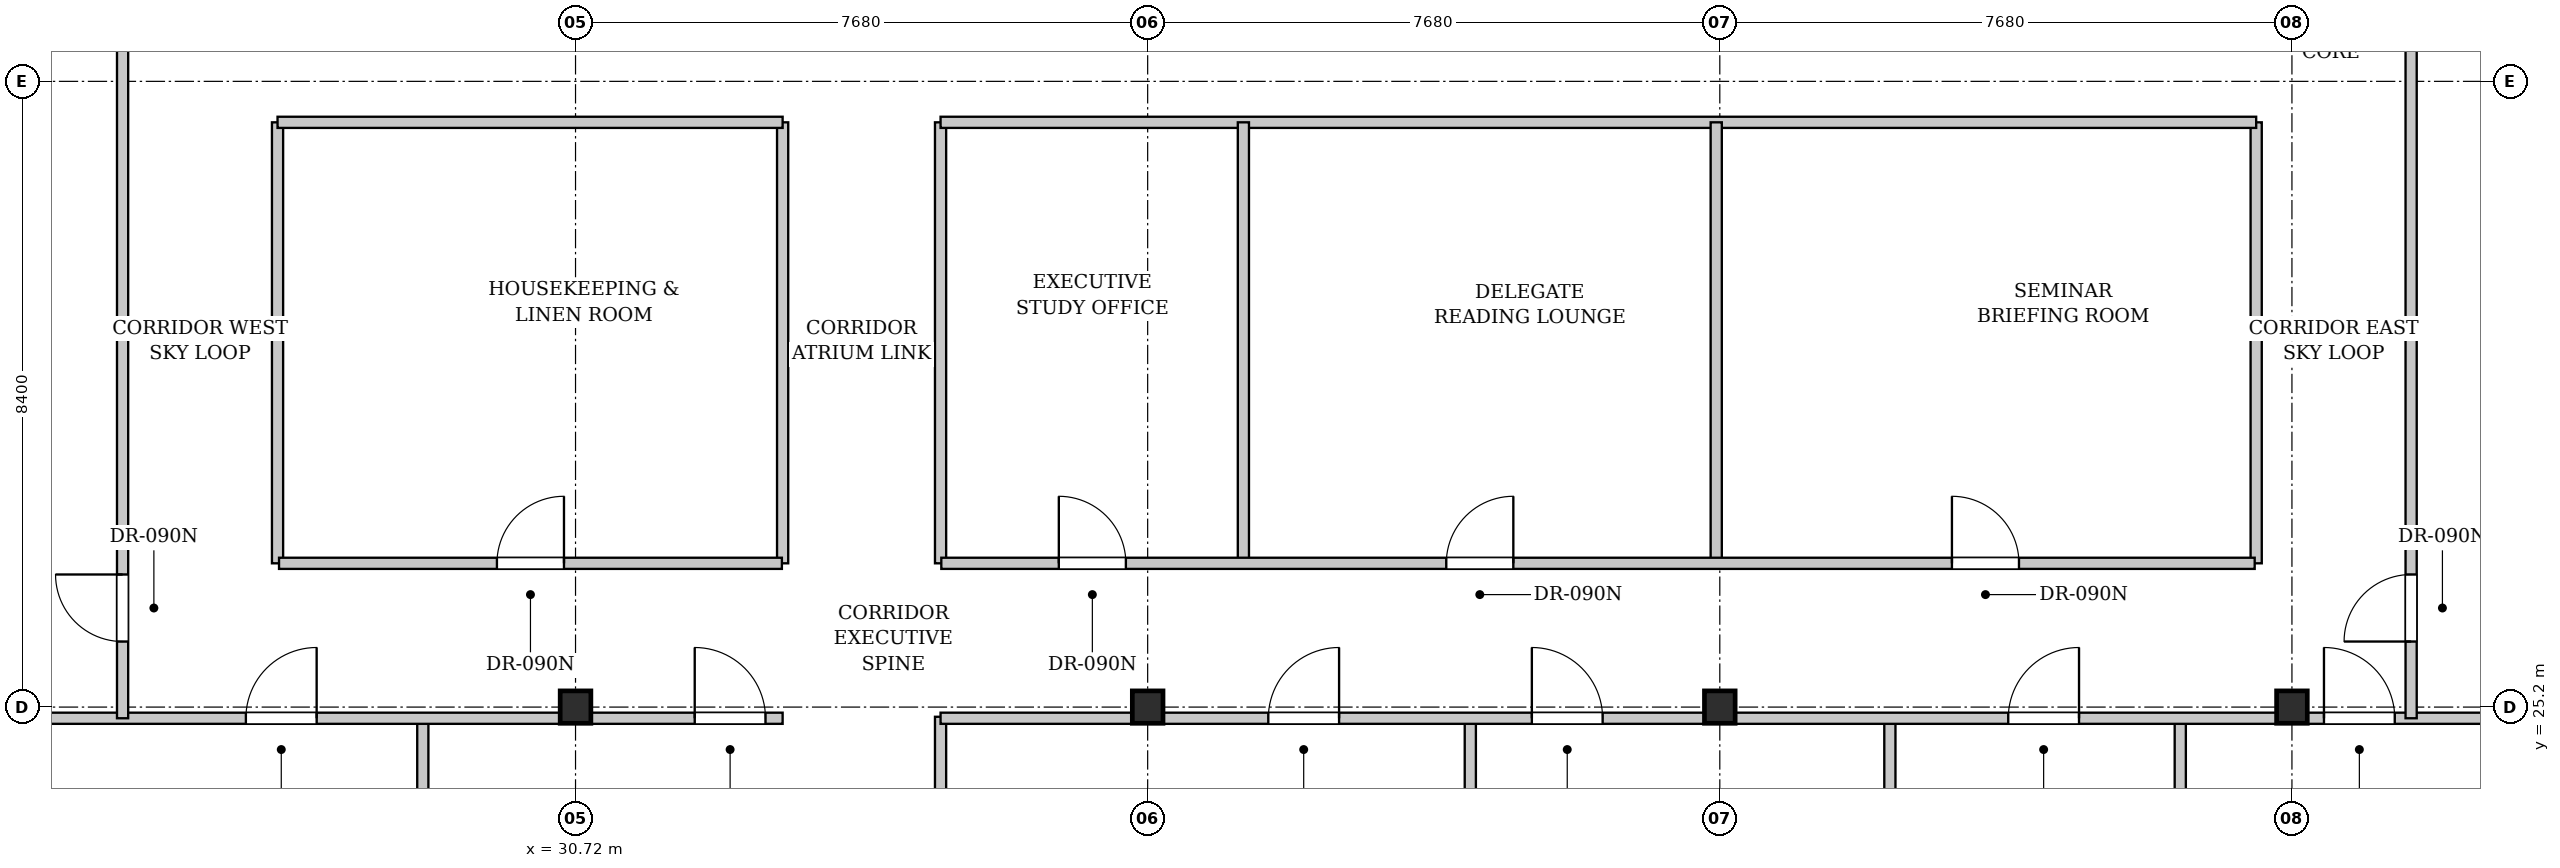
"""IFC4 building model, lengths in metres.
Left out: names, types, materials, properties, quantities, classifications, styles, units other than length and angle.
Written with IfcOpenShell. Run it as: python <this file> out.ifc"""

import sys

from ifc_helpers import new_model, si_unit, direction, frame, frame_2d, origin, origin_2d, place, context, subcontext, project, spatial, rectangle, i_section, extrude, element, fill, save


model = new_model("IFC4")
c1 = context("Model", 3, precision=1e-05, world=origin(), true_north=direction((0.0, 1.0)))
c2 = subcontext(c1, "Body", "Model", "MODEL_VIEW")
j1 = project(units=[si_unit("LENGTHUNIT", "METRE"), si_unit("PLANEANGLEUNIT", "RADIAN")], contexts=[c1])
p1 = place(None, origin())
s1 = spatial("IfcSite", under=j1, at=p1, CompositionType="ELEMENT")
p2 = place(p1, origin())
s2 = spatial("IfcBuilding", under=s1, at=p2, CompositionType="ELEMENT")
p3 = place(p2, frame((0.0, 0.0, 237.5)))
s3 = spatial("IfcBuildingStorey", under=s2, at=p3, CompositionType="ELEMENT", Elevation=237.5)
for number, where, z_axis, x_axis in (
    (1, (30.72, 25.2, 0.0), (0.0, 0.0, 1.0), (1.0, 0.0, 0.0)),
    (2, (38.4, 25.2, 0.0), (0.0, 0.0, 1.0), (1.0, 0.0, 0.0)),
    (3, (46.08, 25.2, 0.0), (0.0, 0.0, 1.0), (1.0, 0.0, 0.0)),
    (4, (53.76, 25.2, 0.0), (0.0, 0.0, 1.0), (1.0, 0.0, 0.0)),
):
    element("IfcColumn", number, at=place(p3, frame(where, z_axis=z_axis, x_axis=x_axis)), inside=s3, PredefinedType="COLUMN", context=c2, shape_type="SweptSolid", body=[
        extrude(i_section(OverallWidth=0.412, OverallDepth=0.435, WebThickness=0.036, FlangeThickness=0.058, FilletRadius=0.015, at=origin_2d()), origin(), (0.0, 0.0, 1.0), 3.3),
    ])
p4 = place(p3, frame((28.67, 12.88, 0.0), z_axis=(0.0, 0.0, 1.0), x_axis=(0.0, 1.0, 0.0)))
e5 = element("IfcWall", 5, at=p4, inside=s3, PredefinedType="PARTITIONING", context=c2, shape_type="SweptSolid", body=[
    extrude(rectangle(XDim=12.19, YDim=0.15, at=frame_2d((6.095, 0.0))), origin(), (0.0, 0.0, 1.0), 3.08),
])
p5 = place(p3, frame((35.62, 13.611, 0.0), z_axis=(0.0, 0.0, 1.0), x_axis=(0.0, 1.0, 0.0)))
e6 = element("IfcWall", 6, at=p5, inside=s3, PredefinedType="PARTITIONING", context=c2, shape_type="SweptSolid", body=[
    extrude(rectangle(XDim=11.459, YDim=0.15, at=frame_2d((5.73, 0.0))), origin(), (0.0, 0.0, 1.0), 3.08),
])
p6 = place(p3, frame((42.731, 14.358, 0.0), z_axis=(0.0, 0.0, 1.0), x_axis=(0.0, 1.0, 0.0)))
e7 = element("IfcWall", 7, at=p6, inside=s3, PredefinedType="PARTITIONING", context=c2, shape_type="SweptSolid", body=[
    extrude(rectangle(XDim=10.712, YDim=0.15, at=frame_2d((5.356, 0.0))), origin(), (0.0, 0.0, 1.0), 3.08),
])
p7 = place(p3, frame((48.363, 14.95, 0.0), z_axis=(0.0, 0.0, 1.0), x_axis=(0.0, 1.0, 0.0)))
e8 = element("IfcWall", 8, at=p7, inside=s3, PredefinedType="PARTITIONING", context=c2, shape_type="SweptSolid", body=[
    extrude(rectangle(XDim=10.12, YDim=0.15, at=frame_2d((5.06, 0.0))), origin(), (0.0, 0.0, 1.0), 3.08),
])
p8 = place(p3, frame((52.261, 15.36, 0.0), z_axis=(0.0, 0.0, 1.0), x_axis=(0.0, 1.0, 0.0)))
e9 = element("IfcWall", 9, at=p8, inside=s3, PredefinedType="PARTITIONING", context=c2, shape_type="SweptSolid", body=[
    extrude(rectangle(XDim=9.71, YDim=0.15, at=frame_2d((4.855, 0.0))), origin(), (0.0, 0.0, 1.0), 3.08),
])
p9 = place(p3, frame((17.314, 25.05, 0.0), z_axis=(0.0, 0.0, 1.0), x_axis=(1.0, 0.0, 0.0)))
e10 = element("IfcWall", 10, at=p9, inside=s3, PredefinedType="PARTITIONING", context=c2, shape_type="SweptSolid", body=[
    extrude(rectangle(XDim=16.186, YDim=0.15, at=frame_2d((8.093, 0.0))), origin(), (0.0, 0.0, 1.0), 2.313),
])
p10 = place(p9, frame((8.981, 0.0, 0.0)))
e11 = element("IfcOpeningElement", 11, at=p10, cuts=e10, PredefinedType="OPENING", context=c2, shape_type="SweptSolid", body=[
    extrude(rectangle(XDim=0.95, YDim=2.15, at=frame_2d((0.475, 1.075))), frame((0.0, 0.085, 0.0), z_axis=(0.0, -1.0, 0.0), x_axis=(1.0, 0.0, 0.0)), (0.0, 0.0, 1.0), 0.17),
])
p11 = place(p9, frame((15.006, 0.0, 0.0)))
e12 = element("IfcOpeningElement", 12, at=p11, cuts=e10, PredefinedType="OPENING", context=c2, shape_type="SweptSolid", body=[
    extrude(rectangle(XDim=0.95, YDim=2.15, at=frame_2d((0.475, 1.075))), frame((0.0, 0.085, 0.0), z_axis=(0.0, -1.0, 0.0), x_axis=(1.0, 0.0, 0.0)), (0.0, 0.0, 1.0), 0.17),
])
p12 = place(p3, frame((35.62, 25.05, 0.0), z_axis=(0.0, 0.0, 1.0), x_axis=(1.0, 0.0, 0.0)))
e13 = element("IfcWall", 13, at=p12, inside=s3, PredefinedType="PARTITIONING", context=c2, shape_type="SweptSolid", body=[
    extrude(rectangle(XDim=35.529, YDim=0.15, at=frame_2d((17.764, 0.0))), origin(), (0.0, 0.0, 1.0), 2.313),
])
p13 = place(p12, frame((4.399, 0.0, 0.0)))
e14 = element("IfcOpeningElement", 14, at=p13, cuts=e13, PredefinedType="OPENING", context=c2, shape_type="SweptSolid", body=[
    extrude(rectangle(XDim=0.95, YDim=2.15, at=frame_2d((0.475, 1.075))), frame((0.0, 0.085, 0.0), z_axis=(0.0, -1.0, 0.0), x_axis=(1.0, 0.0, 0.0)), (0.0, 0.0, 1.0), 0.17),
])
p14 = place(p12, frame((7.937, 0.0, 0.0)))
e15 = element("IfcOpeningElement", 15, at=p14, cuts=e13, PredefinedType="OPENING", context=c2, shape_type="SweptSolid", body=[
    extrude(rectangle(XDim=0.95, YDim=2.15, at=frame_2d((0.475, 1.075))), frame((0.0, 0.085, 0.0), z_axis=(0.0, -1.0, 0.0), x_axis=(1.0, 0.0, 0.0)), (0.0, 0.0, 1.0), 0.17),
])
p15 = place(p12, frame((14.332, 0.0, 0.0)))
e16 = element("IfcOpeningElement", 16, at=p15, cuts=e13, PredefinedType="OPENING", context=c2, shape_type="SweptSolid", body=[
    extrude(rectangle(XDim=0.95, YDim=2.15, at=frame_2d((0.475, 1.075))), frame((0.0, 0.085, 0.0), z_axis=(0.0, -1.0, 0.0), x_axis=(1.0, 0.0, 0.0)), (0.0, 0.0, 1.0), 0.17),
])
p16 = place(p12, frame((18.57, 0.0, 0.0)))
e17 = element("IfcOpeningElement", 17, at=p16, cuts=e13, PredefinedType="OPENING", context=c2, shape_type="SweptSolid", body=[
    extrude(rectangle(XDim=0.95, YDim=2.15, at=frame_2d((0.475, 1.075))), frame((0.0, 0.085, 0.0), z_axis=(0.0, -1.0, 0.0), x_axis=(1.0, 0.0, 0.0)), (0.0, 0.0, 1.0), 0.17),
])
p17 = place(p3, frame((24.64, 25.05, 0.0), z_axis=(0.0, 0.0, 1.0), x_axis=(0.0, 1.0, 0.0)))
e18 = element("IfcWall", 18, at=p17, inside=s3, PredefinedType="PARTITIONING", context=c2, shape_type="SweptSolid", body=[
    extrude(rectangle(XDim=10.09, YDim=0.15, at=frame_2d((5.045, 0.0))), origin(), (0.0, 0.0, 1.0), 3.08),
])
p18 = place(p17, frame((1.03, 0.0, 0.0)))
e19 = element("IfcOpeningElement", 19, at=p18, cuts=e18, PredefinedType="OPENING", context=c2, shape_type="SweptSolid", body=[
    extrude(rectangle(XDim=0.9, YDim=2.15, at=frame_2d((0.45, 1.075))), frame((0.0, 0.085, 0.0), z_axis=(0.0, -1.0, 0.0), x_axis=(1.0, 0.0, 0.0)), (0.0, 0.0, 1.0), 0.17),
])
p19 = place(p3, frame((55.36, 25.05, 0.0), z_axis=(0.0, 0.0, 1.0), x_axis=(0.0, 1.0, 0.0)))
e20 = element("IfcWall", 20, at=p19, inside=s3, PredefinedType="PARTITIONING", context=c2, shape_type="SweptSolid", body=[
    extrude(rectangle(XDim=24.863, YDim=0.15, at=frame_2d((12.431, 0.0))), origin(), (0.0, 0.0, 1.0), 3.08),
])
p20 = place(p19, frame((1.03, 0.0, 0.0)))
e21 = element("IfcOpeningElement", 21, at=p20, cuts=e20, PredefinedType="OPENING", context=c2, shape_type="SweptSolid", body=[
    extrude(rectangle(XDim=0.9, YDim=2.15, at=frame_2d((0.45, 1.075))), frame((0.0, 0.085, 0.0), z_axis=(0.0, -1.0, 0.0), x_axis=(1.0, 0.0, 0.0)), (0.0, 0.0, 1.0), 0.17),
])
for number, where, z_axis, x_axis in (
    (22, (26.72, 27.13, 0.0), (0.0, 0.0, 1.0), (0.0, 1.0, 0.0)),
    (23, (53.28, 27.13, 0.0), (0.0, 0.0, 1.0), (0.0, 1.0, 0.0)),
    (24, (33.5, 27.13, 0.0), (0.0, 0.0, 1.0), (0.0, 1.0, 0.0)),
    (25, (35.62, 27.13, 0.0), (0.0, 0.0, 1.0), (0.0, 1.0, 0.0)),
):
    element("IfcWall", number, at=place(p3, frame(where, z_axis=z_axis, x_axis=x_axis)), inside=s3, PredefinedType="PARTITIONING", context=c2, shape_type="SweptSolid", body=[
        extrude(rectangle(XDim=5.92, YDim=0.15, at=frame_2d((2.96, 0.0))), origin(), (0.0, 0.0, 1.0), 3.08),
    ])
p21 = place(p3, frame((26.72, 33.05, 0.0), z_axis=(0.0, 0.0, 1.0), x_axis=(1.0, 0.0, 0.0)))
e26 = element("IfcWall", 26, at=p21, inside=s3, PredefinedType="PARTITIONING", context=c2, shape_type="SweptSolid", body=[
    extrude(rectangle(XDim=6.78, YDim=0.15, at=frame_2d((3.39, 0.0))), origin(), (0.0, 0.0, 1.0), 3.08),
])
p22 = place(p3, frame((35.62, 33.05, 0.0), z_axis=(0.0, 0.0, 1.0), x_axis=(1.0, 0.0, 0.0)))
e27 = element("IfcWall", 27, at=p22, inside=s3, PredefinedType="PARTITIONING", context=c2, shape_type="SweptSolid", body=[
    extrude(rectangle(XDim=17.66, YDim=0.15, at=frame_2d((8.83, 0.0))), origin(), (0.0, 0.0, 1.0), 3.08),
])
p23 = place(p3, frame((26.74, 27.13, 0.0), z_axis=(0.0, 0.0, 1.0), x_axis=(1.0, 0.0, 0.0)))
e28 = element("IfcWall", 28, at=p23, inside=s3, PredefinedType="PARTITIONING", context=c2, shape_type="SweptSolid", body=[
    extrude(rectangle(XDim=6.75, YDim=0.15, at=frame_2d((3.375, 0.0))), origin(), (0.0, 0.0, 1.0), 3.08),
])
p24 = place(p23, frame((2.925, 0.0, 0.0)))
e29 = element("IfcOpeningElement", 29, at=p24, cuts=e28, PredefinedType="OPENING", context=c2, shape_type="SweptSolid", body=[
    extrude(rectangle(XDim=0.9, YDim=2.15, at=frame_2d((0.45, 1.075))), frame((0.0, 0.085, 0.0), z_axis=(0.0, -1.0, 0.0), x_axis=(1.0, 0.0, 0.0)), (0.0, 0.0, 1.0), 0.17),
])
p25 = place(p3, frame((39.685, 27.13, 0.0), z_axis=(0.0, 0.0, 1.0), x_axis=(0.0, 1.0, 0.0)))
e30 = element("IfcWall", 30, at=p25, inside=s3, PredefinedType="PARTITIONING", context=c2, shape_type="SweptSolid", body=[
    extrude(rectangle(XDim=5.92, YDim=0.15, at=frame_2d((2.96, 0.0))), origin(), (0.0, 0.0, 1.0), 3.08),
])
p26 = place(p3, frame((46.032, 27.13, 0.0), z_axis=(0.0, 0.0, 1.0), x_axis=(0.0, 1.0, 0.0)))
e31 = element("IfcWall", 31, at=p26, inside=s3, PredefinedType="PARTITIONING", context=c2, shape_type="SweptSolid", body=[
    extrude(rectangle(XDim=5.92, YDim=0.15, at=frame_2d((2.96, 0.0))), origin(), (0.0, 0.0, 1.0), 2.313),
])
p27 = place(p3, frame((35.63, 27.13, 0.0), z_axis=(0.0, 0.0, 1.0), x_axis=(1.0, 0.0, 0.0)))
e32 = element("IfcWall", 32, at=p27, inside=s3, PredefinedType="PARTITIONING", context=c2, shape_type="SweptSolid", body=[
    extrude(rectangle(XDim=17.63, YDim=0.15, at=frame_2d((8.815, 0.0))), origin(), (0.0, 0.0, 1.0), 3.08),
])
p28 = place(p27, frame((1.577, 0.0, 0.0)))
e33 = element("IfcOpeningElement", 33, at=p28, cuts=e32, PredefinedType="OPENING", context=c2, shape_type="SweptSolid", body=[
    extrude(rectangle(XDim=0.9, YDim=2.15, at=frame_2d((0.45, 1.075))), frame((0.0, 0.085, 0.0), z_axis=(0.0, -1.0, 0.0), x_axis=(1.0, 0.0, 0.0)), (0.0, 0.0, 1.0), 0.17),
])
p29 = place(p27, frame((6.779, 0.0, 0.0)))
e34 = element("IfcOpeningElement", 34, at=p29, cuts=e32, PredefinedType="OPENING", context=c2, shape_type="SweptSolid", body=[
    extrude(rectangle(XDim=0.9, YDim=2.15, at=frame_2d((0.45, 1.075))), frame((0.0, 0.085, 0.0), z_axis=(0.0, -1.0, 0.0), x_axis=(1.0, 0.0, 0.0)), (0.0, 0.0, 1.0), 0.17),
])
p30 = place(p27, frame((13.566, 0.0, 0.0)))
e35 = element("IfcOpeningElement", 35, at=p30, cuts=e32, PredefinedType="OPENING", context=c2, shape_type="SweptSolid", body=[
    extrude(rectangle(XDim=0.9, YDim=2.15, at=frame_2d((0.45, 1.075))), frame((0.0, 0.085, 0.0), z_axis=(0.0, -1.0, 0.0), x_axis=(1.0, 0.0, 0.0)), (0.0, 0.0, 1.0), 0.17),
])
p31 = place(p10, origin())
e36 = element("IfcDoor", 36, at=p31, inside=s3, OperationType="SINGLE_SWING_RIGHT", PredefinedType="DOOR", context=c2, shape_type="SweptSolid", body=[
    extrude(rectangle(XDim=0.95, YDim=2.15, at=frame_2d((0.475, 1.075))), frame((0.0, 0.025, 0.0), z_axis=(0.0, -1.0, 0.0), x_axis=(1.0, 0.0, 0.0)), (0.0, 0.0, 1.0), 0.05),
])
fill(e11, e36)
p32 = place(p11, origin())
e37 = element("IfcDoor", 37, at=p32, inside=s3, OperationType="SINGLE_SWING_LEFT", PredefinedType="DOOR", context=c2, shape_type="SweptSolid", body=[
    extrude(rectangle(XDim=0.95, YDim=2.15, at=frame_2d((0.475, 1.075))), frame((0.0, 0.025, 0.0), z_axis=(0.0, -1.0, 0.0), x_axis=(1.0, 0.0, 0.0)), (0.0, 0.0, 1.0), 0.05),
])
fill(e12, e37)
p33 = place(p13, origin())
e38 = element("IfcDoor", 38, at=p33, inside=s3, OperationType="SINGLE_SWING_RIGHT", PredefinedType="DOOR", context=c2, shape_type="SweptSolid", body=[
    extrude(rectangle(XDim=0.95, YDim=2.15, at=frame_2d((0.475, 1.075))), frame((0.0, 0.025, 0.0), z_axis=(0.0, -1.0, 0.0), x_axis=(1.0, 0.0, 0.0)), (0.0, 0.0, 1.0), 0.05),
])
fill(e14, e38)
p34 = place(p14, origin())
e39 = element("IfcDoor", 39, at=p34, inside=s3, OperationType="SINGLE_SWING_LEFT", PredefinedType="DOOR", context=c2, shape_type="SweptSolid", body=[
    extrude(rectangle(XDim=0.95, YDim=2.15, at=frame_2d((0.475, 1.075))), frame((0.0, 0.025, 0.0), z_axis=(0.0, -1.0, 0.0), x_axis=(1.0, 0.0, 0.0)), (0.0, 0.0, 1.0), 0.05),
])
fill(e15, e39)
p35 = place(p15, origin())
e40 = element("IfcDoor", 40, at=p35, inside=s3, OperationType="SINGLE_SWING_RIGHT", PredefinedType="DOOR", context=c2, shape_type="SweptSolid", body=[
    extrude(rectangle(XDim=0.95, YDim=2.15, at=frame_2d((0.475, 1.075))), frame((0.0, 0.025, 0.0), z_axis=(0.0, -1.0, 0.0), x_axis=(1.0, 0.0, 0.0)), (0.0, 0.0, 1.0), 0.05),
])
fill(e16, e40)
p36 = place(p16, origin())
e41 = element("IfcDoor", 41, at=p36, inside=s3, OperationType="SINGLE_SWING_LEFT", PredefinedType="DOOR", context=c2, shape_type="SweptSolid", body=[
    extrude(rectangle(XDim=0.95, YDim=2.15, at=frame_2d((0.475, 1.075))), frame((0.0, 0.025, 0.0), z_axis=(0.0, -1.0, 0.0), x_axis=(1.0, 0.0, 0.0)), (0.0, 0.0, 1.0), 0.05),
])
fill(e17, e41)
p37 = place(p18, origin())
e42 = element("IfcDoor", 42, at=p37, inside=s3, OperationType="SINGLE_SWING_RIGHT", PredefinedType="DOOR", context=c2, shape_type="SweptSolid", body=[
    extrude(rectangle(XDim=0.9, YDim=2.15, at=frame_2d((0.45, 1.075))), frame((0.0, 0.025, 0.0), z_axis=(0.0, -1.0, 0.0), x_axis=(1.0, 0.0, 0.0)), (0.0, 0.0, 1.0), 0.05),
])
fill(e19, e42)
p38 = place(p20, origin())
e43 = element("IfcDoor", 43, at=p38, inside=s3, OperationType="SINGLE_SWING_LEFT", PredefinedType="DOOR", context=c2, shape_type="SweptSolid", body=[
    extrude(rectangle(XDim=0.9, YDim=2.15, at=frame_2d((0.45, 1.075))), frame((0.0, 0.025, 0.0), z_axis=(0.0, -1.0, 0.0), x_axis=(1.0, 0.0, 0.0)), (0.0, 0.0, 1.0), 0.05),
])
fill(e21, e43)
p39 = place(p24, origin())
e44 = element("IfcDoor", 44, at=p39, inside=s3, OperationType="SINGLE_SWING_RIGHT", PredefinedType="DOOR", context=c2, shape_type="SweptSolid", body=[
    extrude(rectangle(XDim=0.9, YDim=2.15, at=frame_2d((0.45, 1.075))), frame((0.0, 0.025, 0.0), z_axis=(0.0, -1.0, 0.0), x_axis=(1.0, 0.0, 0.0)), (0.0, 0.0, 1.0), 0.05),
])
fill(e29, e44)
p40 = place(p28, origin())
e45 = element("IfcDoor", 45, at=p40, inside=s3, OperationType="SINGLE_SWING_LEFT", PredefinedType="DOOR", context=c2, shape_type="SweptSolid", body=[
    extrude(rectangle(XDim=0.9, YDim=2.15, at=frame_2d((0.45, 1.075))), frame((0.0, 0.025, 0.0), z_axis=(0.0, -1.0, 0.0), x_axis=(1.0, 0.0, 0.0)), (0.0, 0.0, 1.0), 0.05),
])
fill(e33, e45)
p41 = place(p29, origin())
e46 = element("IfcDoor", 46, at=p41, inside=s3, OperationType="SINGLE_SWING_RIGHT", PredefinedType="DOOR", context=c2, shape_type="SweptSolid", body=[
    extrude(rectangle(XDim=0.9, YDim=2.15, at=frame_2d((0.45, 1.075))), frame((0.0, 0.025, 0.0), z_axis=(0.0, -1.0, 0.0), x_axis=(1.0, 0.0, 0.0)), (0.0, 0.0, 1.0), 0.05),
])
fill(e34, e46)
p42 = place(p30, origin())
e47 = element("IfcDoor", 47, at=p42, inside=s3, OperationType="SINGLE_SWING_LEFT", PredefinedType="DOOR", context=c2, shape_type="SweptSolid", body=[
    extrude(rectangle(XDim=0.9, YDim=2.15, at=frame_2d((0.45, 1.075))), frame((0.0, 0.025, 0.0), z_axis=(0.0, -1.0, 0.0), x_axis=(1.0, 0.0, 0.0)), (0.0, 0.0, 1.0), 0.05),
])
fill(e35, e47)
save(model, sys.argv[1])
